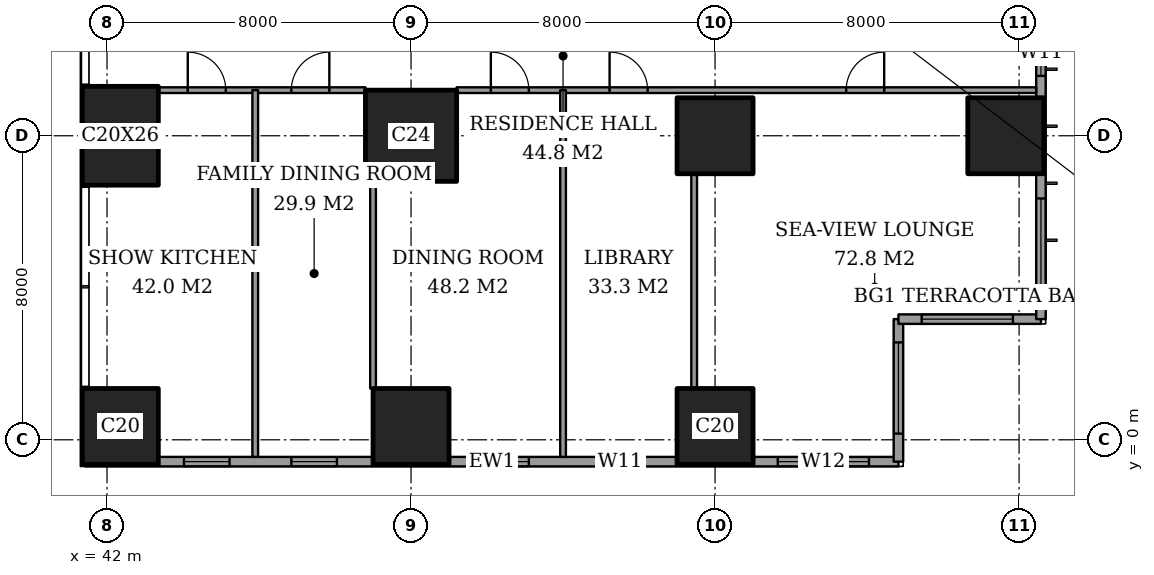
"""IFC4 building model, lengths in metres.
Left out: names, types, materials, properties, quantities, classifications, styles, units other than length and angle.
Written with IfcOpenShell. Run it as: python <this file> out.ifc"""

import sys

from ifc_helpers import new_model, si_unit, direction, frame, frame_2d, origin, origin_2d, place, context, subcontext, project, spatial, rectangle, extrude, element, fill, save


model = new_model("IFC4")
c1 = context("Model", 3, precision=1e-05, world=origin(), true_north=direction((0.0, 1.0)))
c2 = subcontext(c1, "Body", "Model", "MODEL_VIEW")
j1 = project(units=[si_unit("LENGTHUNIT", "METRE"), si_unit("PLANEANGLEUNIT", "RADIAN")], contexts=[c1])
p1 = place(None, origin())
s1 = spatial("IfcSite", under=j1, at=p1, CompositionType="ELEMENT")
p2 = place(p1, origin())
s2 = spatial("IfcBuilding", under=s1, at=p2, CompositionType="ELEMENT")
p3 = place(p2, frame((0.0, 0.0, 117.8)))
s3 = spatial("IfcBuildingStorey", under=s2, at=p3, CompositionType="ELEMENT", Elevation=117.8)
p4 = place(p3, frame((42.35, 0.35, 0.0), z_axis=(0.0, 0.0, 1.0), x_axis=(1.0, 0.0, 0.0)))
e1 = element("IfcColumn", 1, at=p4, inside=s3, PredefinedType="COLUMN", context=c2, shape_type="SweptSolid", body=[
    extrude(rectangle(XDim=2.0, YDim=2.0, at=origin_2d()), origin(), (0.0, 0.0, 1.0), 3.6),
])
p5 = place(p3, frame((42.35, 8.0, 0.0), z_axis=(0.0, 0.0, 1.0), x_axis=(1.0, 0.0, 0.0)))
e2 = element("IfcColumn", 2, at=p5, inside=s3, PredefinedType="COLUMN", context=c2, shape_type="SweptSolid", body=[
    extrude(rectangle(XDim=2.0, YDim=2.6, at=origin_2d()), origin(), (0.0, 0.0, 1.0), 3.6),
])
p6 = place(p3, frame((50.0, 0.35, 0.0), z_axis=(0.0, 0.0, 1.0), x_axis=(1.0, 0.0, 0.0)))
e3 = element("IfcColumn", 3, at=p6, inside=s3, PredefinedType="COLUMN", context=c2, shape_type="SweptSolid", body=[
    extrude(rectangle(XDim=2.0, YDim=2.0, at=origin_2d()), origin(), (0.0, 0.0, 1.0), 3.6),
])
p7 = place(p3, frame((50.0, 8.0, 0.0), z_axis=(0.0, 0.0, 1.0), x_axis=(1.0, 0.0, 0.0)))
e4 = element("IfcColumn", 4, at=p7, inside=s3, PredefinedType="COLUMN", context=c2, shape_type="SweptSolid", body=[
    extrude(rectangle(XDim=2.4, YDim=2.4, at=origin_2d()), origin(), (0.0, 0.0, 1.0), 3.6),
])
for number, where, z_axis, x_axis in (
    (5, (58.0, 0.35, 0.0), (0.0, 0.0, 1.0), (1.0, 0.0, 0.0)),
    (6, (58.0, 8.0, 0.0), (0.0, 0.0, 1.0), (1.0, 0.0, 0.0)),
    (7, (65.65, 8.0, 0.0), (0.0, 0.0, 1.0), (1.0, 0.0, 0.0)),
):
    element("IfcColumn", number, at=place(p3, frame(where, z_axis=z_axis, x_axis=x_axis)), inside=s3, PredefinedType="COLUMN", context=c2, shape_type="SweptSolid", body=[
        extrude(rectangle(XDim=2.0, YDim=2.0, at=origin_2d()), origin(), (0.0, 0.0, 1.0), 3.6),
    ])
p8 = place(p3, frame((41.425, -0.575, 0.0), z_axis=(0.0, 0.0, 1.0), x_axis=(1.0, 0.0, 0.0)))
e8 = element("IfcWall", 8, at=p8, inside=s3, PredefinedType="SOLIDWALL", context=c2, shape_type="SweptSolid", body=[
    extrude(rectangle(XDim=21.4, YDim=0.25, at=frame_2d((10.7, 0.0))), origin(), (0.0, 0.0, 1.0), 3.6),
])
p9 = place(p8, frame((2.6, 0.0, 0.4)))
e9 = element("IfcOpeningElement", 9, at=p9, cuts=e8, PredefinedType="OPENING", context=c2, shape_type="SweptSolid", body=[
    extrude(rectangle(XDim=1.2, YDim=2.2, at=frame_2d((0.6, 1.1))), frame((0.0, 0.135, 0.0), z_axis=(0.0, -1.0, 0.0), x_axis=(1.0, 0.0, 0.0)), (0.0, 0.0, 1.0), 0.27),
])
p10 = place(p8, frame((5.425, 0.0, 0.4)))
e10 = element("IfcOpeningElement", 10, at=p10, cuts=e8, PredefinedType="OPENING", context=c2, shape_type="SweptSolid", body=[
    extrude(rectangle(XDim=1.2, YDim=2.2, at=frame_2d((0.6, 1.1))), frame((0.0, 0.135, 0.0), z_axis=(0.0, -1.0, 0.0), x_axis=(1.0, 0.0, 0.0)), (0.0, 0.0, 1.0), 0.27),
])
p11 = place(p8, frame((10.475, 0.0, 0.4)))
e11 = element("IfcOpeningElement", 11, at=p11, cuts=e8, PredefinedType="OPENING", context=c2, shape_type="SweptSolid", body=[
    extrude(rectangle(XDim=1.2, YDim=2.2, at=frame_2d((0.6, 1.1))), frame((0.0, 0.135, 0.0), z_axis=(0.0, -1.0, 0.0), x_axis=(1.0, 0.0, 0.0)), (0.0, 0.0, 1.0), 0.27),
])
p12 = place(p8, frame((13.475, 0.0, 0.4)))
e12 = element("IfcOpeningElement", 12, at=p12, cuts=e8, PredefinedType="OPENING", context=c2, shape_type="SweptSolid", body=[
    extrude(rectangle(XDim=1.2, YDim=2.2, at=frame_2d((0.6, 1.1))), frame((0.0, 0.135, 0.0), z_axis=(0.0, -1.0, 0.0), x_axis=(1.0, 0.0, 0.0)), (0.0, 0.0, 1.0), 0.27),
])
p13 = place(p8, frame((18.225, 0.0, 0.4)))
e13 = element("IfcOpeningElement", 13, at=p13, cuts=e8, PredefinedType="OPENING", context=c2, shape_type="SweptSolid", body=[
    extrude(rectangle(XDim=2.4, YDim=2.2, at=frame_2d((1.2, 1.1))), frame((0.0, 0.135, 0.0), z_axis=(0.0, -1.0, 0.0), x_axis=(1.0, 0.0, 0.0)), (0.0, 0.0, 1.0), 0.27),
])
p14 = place(p3, frame((62.825, -0.575, 0.0), z_axis=(0.0, 0.0, 1.0), x_axis=(0.0, 1.0, 0.0)))
e14 = element("IfcWall", 14, at=p14, inside=s3, PredefinedType="SOLIDWALL", context=c2, shape_type="SweptSolid", body=[
    extrude(rectangle(XDim=3.75, YDim=0.25, at=frame_2d((1.875, 0.0))), origin(), (0.0, 0.0, 1.0), 3.6),
])
p15 = place(p14, frame((0.738, 0.0, 0.4)))
e15 = element("IfcOpeningElement", 15, at=p15, cuts=e14, PredefinedType="OPENING", context=c2, shape_type="SweptSolid", body=[
    extrude(rectangle(XDim=2.4, YDim=2.2, at=frame_2d((1.2, 1.1))), frame((0.0, 0.135, 0.0), z_axis=(0.0, -1.0, 0.0), x_axis=(1.0, 0.0, 0.0)), (0.0, 0.0, 1.0), 0.27),
])
p16 = place(p3, frame((62.825, 3.175, 0.0), z_axis=(0.0, 0.0, 1.0), x_axis=(1.0, 0.0, 0.0)))
e16 = element("IfcWall", 16, at=p16, inside=s3, PredefinedType="SOLIDWALL", context=c2, shape_type="SweptSolid", body=[
    extrude(rectangle(XDim=3.75, YDim=0.25, at=frame_2d((1.875, 0.0))), origin(), (0.0, 0.0, 1.0), 3.6),
])
p17 = place(p16, frame((0.613, 0.0, 0.4)))
e17 = element("IfcOpeningElement", 17, at=p17, cuts=e16, PredefinedType="OPENING", context=c2, shape_type="SweptSolid", body=[
    extrude(rectangle(XDim=2.4, YDim=2.2, at=frame_2d((1.2, 1.1))), frame((0.0, 0.135, 0.0), z_axis=(0.0, -1.0, 0.0), x_axis=(1.0, 0.0, 0.0)), (0.0, 0.0, 1.0), 0.27),
])
p18 = place(p3, frame((66.575, 3.175, 0.0), z_axis=(0.0, 0.0, 1.0), x_axis=(0.0, 1.0, 0.0)))
e18 = element("IfcWall", 18, at=p18, inside=s3, PredefinedType="SOLIDWALL", context=c2, shape_type="SweptSolid", body=[
    extrude(rectangle(XDim=41.65, YDim=0.25, at=frame_2d((20.825, 0.0))), origin(), (0.0, 0.0, 1.0), 3.6),
])
p19 = place(p18, frame((0.775, 0.0, 0.4)))
e19 = element("IfcOpeningElement", 19, at=p19, cuts=e18, PredefinedType="OPENING", context=c2, shape_type="SweptSolid", body=[
    extrude(rectangle(XDim=2.4, YDim=2.2, at=frame_2d((1.2, 1.1))), frame((0.0, 0.135, 0.0), z_axis=(0.0, -1.0, 0.0), x_axis=(1.0, 0.0, 0.0)), (0.0, 0.0, 1.0), 0.27),
])
p20 = place(p18, frame((6.4, 0.0, 0.4)))
e20 = element("IfcOpeningElement", 20, at=p20, cuts=e18, PredefinedType="OPENING", context=c2, shape_type="SweptSolid", body=[
    extrude(rectangle(XDim=1.2, YDim=2.2, at=frame_2d((0.6, 1.1))), frame((0.0, 0.135, 0.0), z_axis=(0.0, -1.0, 0.0), x_axis=(1.0, 0.0, 0.0)), (0.0, 0.0, 1.0), 0.27),
])
p21 = place(p18, frame((8.475, 0.0, 0.4)))
e21 = element("IfcOpeningElement", 21, at=p21, cuts=e18, PredefinedType="OPENING", context=c2, shape_type="SweptSolid", body=[
    extrude(rectangle(XDim=2.4, YDim=2.2, at=frame_2d((1.2, 1.1))), frame((0.0, 0.135, 0.0), z_axis=(0.0, -1.0, 0.0), x_axis=(1.0, 0.0, 0.0)), (0.0, 0.0, 1.0), 0.27),
])
p22 = place(p18, frame((15.775, 0.0, 0.4)))
e22 = element("IfcOpeningElement", 22, at=p22, cuts=e18, PredefinedType="OPENING", context=c2, shape_type="SweptSolid", body=[
    extrude(rectangle(XDim=2.4, YDim=2.2, at=frame_2d((1.2, 1.1))), frame((0.0, 0.135, 0.0), z_axis=(0.0, -1.0, 0.0), x_axis=(1.0, 0.0, 0.0)), (0.0, 0.0, 1.0), 0.27),
])
p23 = place(p18, frame((23.475, 0.0, 0.4)))
e23 = element("IfcOpeningElement", 23, at=p23, cuts=e18, PredefinedType="OPENING", context=c2, shape_type="SweptSolid", body=[
    extrude(rectangle(XDim=2.4, YDim=2.2, at=frame_2d((1.2, 1.1))), frame((0.0, 0.135, 0.0), z_axis=(0.0, -1.0, 0.0), x_axis=(1.0, 0.0, 0.0)), (0.0, 0.0, 1.0), 0.27),
])
p24 = place(p18, frame((30.975, 0.0, 0.4)))
e24 = element("IfcOpeningElement", 24, at=p24, cuts=e18, PredefinedType="OPENING", context=c2, shape_type="SweptSolid", body=[
    extrude(rectangle(XDim=2.4, YDim=2.2, at=frame_2d((1.2, 1.1))), frame((0.0, 0.135, 0.0), z_axis=(0.0, -1.0, 0.0), x_axis=(1.0, 0.0, 0.0)), (0.0, 0.0, 1.0), 0.27),
])
p25 = place(p18, frame((34.5, 0.0, 0.4)))
e25 = element("IfcOpeningElement", 25, at=p25, cuts=e18, PredefinedType="OPENING", context=c2, shape_type="SweptSolid", body=[
    extrude(rectangle(XDim=1.2, YDim=2.2, at=frame_2d((0.6, 1.1))), frame((0.0, 0.135, 0.0), z_axis=(0.0, -1.0, 0.0), x_axis=(1.0, 0.0, 0.0)), (0.0, 0.0, 1.0), 0.27),
])
p26 = place(p18, frame((38.475, 0.0, 0.4)))
e26 = element("IfcOpeningElement", 26, at=p26, cuts=e18, PredefinedType="OPENING", context=c2, shape_type="SweptSolid", body=[
    extrude(rectangle(XDim=2.4, YDim=2.2, at=frame_2d((1.2, 1.1))), frame((0.0, 0.135, 0.0), z_axis=(0.0, -1.0, 0.0), x_axis=(1.0, 0.0, 0.0)), (0.0, 0.0, 1.0), 0.27),
])
p27 = place(p3, frame((43.35, 9.2, 0.0), z_axis=(0.0, 0.0, 1.0), x_axis=(1.0, 0.0, 0.0)))
e27 = element("IfcWall", 27, at=p27, inside=s3, PredefinedType="PARTITIONING", context=c2, shape_type="SweptSolid", body=[
    extrude(rectangle(XDim=5.45, YDim=0.15, at=frame_2d((2.725, 0.0))), origin(), (0.0, 0.0, 1.0), 3.35),
])
p28 = place(p27, frame((3.5, 0.0, 0.0)))
e28 = element("IfcOpeningElement", 28, at=p28, cuts=e27, PredefinedType="OPENING", context=c2, shape_type="SweptSolid", body=[
    extrude(rectangle(XDim=1.0, YDim=2.1, at=frame_2d((0.5, 1.05))), frame((0.0, 0.085, 0.0), z_axis=(0.0, -1.0, 0.0), x_axis=(1.0, 0.0, 0.0)), (0.0, 0.0, 1.0), 0.17),
])
p29 = place(p27, frame((0.775, 0.0, 0.0)))
e29 = element("IfcOpeningElement", 29, at=p29, cuts=e27, PredefinedType="OPENING", context=c2, shape_type="SweptSolid", body=[
    extrude(rectangle(XDim=1.0, YDim=2.1, at=frame_2d((0.5, 1.05))), frame((0.0, 0.085, 0.0), z_axis=(0.0, -1.0, 0.0), x_axis=(1.0, 0.0, 0.0)), (0.0, 0.0, 1.0), 0.17),
])
p30 = place(p3, frame((51.2, 9.2, 0.0), z_axis=(0.0, 0.0, 1.0), x_axis=(1.0, 0.0, 0.0)))
e30 = element("IfcWall", 30, at=p30, inside=s3, PredefinedType="PARTITIONING", context=c2, shape_type="SweptSolid", body=[
    extrude(rectangle(XDim=15.25, YDim=0.15, at=frame_2d((7.625, 0.0))), origin(), (0.0, 0.0, 1.0), 3.35),
])
p31 = place(p30, frame((10.25, 0.0, 0.0)))
e31 = element("IfcOpeningElement", 31, at=p31, cuts=e30, PredefinedType="OPENING", context=c2, shape_type="SweptSolid", body=[
    extrude(rectangle(XDim=1.0, YDim=2.1, at=frame_2d((0.5, 1.05))), frame((0.0, 0.085, 0.0), z_axis=(0.0, -1.0, 0.0), x_axis=(1.0, 0.0, 0.0)), (0.0, 0.0, 1.0), 0.17),
])
p32 = place(p30, frame((4.025, 0.0, 0.0)))
e32 = element("IfcOpeningElement", 32, at=p32, cuts=e30, PredefinedType="OPENING", context=c2, shape_type="SweptSolid", body=[
    extrude(rectangle(XDim=1.0, YDim=2.1, at=frame_2d((0.5, 1.05))), frame((0.0, 0.085, 0.0), z_axis=(0.0, -1.0, 0.0), x_axis=(1.0, 0.0, 0.0)), (0.0, 0.0, 1.0), 0.17),
])
p33 = place(p30, frame((0.9, 0.0, 0.0)))
e33 = element("IfcOpeningElement", 33, at=p33, cuts=e30, PredefinedType="OPENING", context=c2, shape_type="SweptSolid", body=[
    extrude(rectangle(XDim=1.0, YDim=2.1, at=frame_2d((0.5, 1.05))), frame((0.0, 0.085, 0.0), z_axis=(0.0, -1.0, 0.0), x_axis=(1.0, 0.0, 0.0)), (0.0, 0.0, 1.0), 0.17),
])
p34 = place(p3, frame((45.9, -0.45, 0.0), z_axis=(0.0, 0.0, 1.0), x_axis=(0.0, 1.0, 0.0)))
e34 = element("IfcWall", 34, at=p34, inside=s3, PredefinedType="PARTITIONING", context=c2, shape_type="SweptSolid", body=[
    extrude(rectangle(XDim=9.65, YDim=0.15, at=frame_2d((4.825, 0.0))), origin(), (0.0, 0.0, 1.0), 3.35),
])
p35 = place(p3, frame((49.0, 1.35, 0.0), z_axis=(0.0, 0.0, 1.0), x_axis=(0.0, 1.0, 0.0)))
e35 = element("IfcWall", 35, at=p35, inside=s3, PredefinedType="PARTITIONING", context=c2, shape_type="SweptSolid", body=[
    extrude(rectangle(XDim=5.45, YDim=0.15, at=frame_2d((2.725, 0.0))), origin(), (0.0, 0.0, 1.0), 3.35),
])
p36 = place(p3, frame((54.0, -0.45, 0.0), z_axis=(0.0, 0.0, 1.0), x_axis=(0.0, 1.0, 0.0)))
e36 = element("IfcWall", 36, at=p36, inside=s3, PredefinedType="PARTITIONING", context=c2, shape_type="SweptSolid", body=[
    extrude(rectangle(XDim=9.65, YDim=0.15, at=frame_2d((4.825, 0.0))), origin(), (0.0, 0.0, 1.0), 3.35),
])
p37 = place(p3, frame((57.45, 1.35, 0.0), z_axis=(0.0, 0.0, 1.0), x_axis=(0.0, 1.0, 0.0)))
e37 = element("IfcWall", 37, at=p37, inside=s3, PredefinedType="PARTITIONING", context=c2, shape_type="SweptSolid", body=[
    extrude(rectangle(XDim=5.65, YDim=0.15, at=frame_2d((2.825, 0.0))), origin(), (0.0, 0.0, 1.0), 3.35),
])
p38 = place(p9, origin())
e38 = element("IfcWindow", 38, at=p38, inside=s3, PartitioningType="SINGLE_PANEL", PredefinedType="WINDOW", context=c2, shape_type="SweptSolid", body=[
    extrude(rectangle(XDim=1.2, YDim=2.2, at=frame_2d((0.6, 1.1))), frame((0.0, 0.03, 0.0), z_axis=(0.0, -1.0, 0.0), x_axis=(1.0, 0.0, 0.0)), (0.0, 0.0, 1.0), 0.06),
])
fill(e9, e38)
p39 = place(p10, origin())
e39 = element("IfcWindow", 39, at=p39, inside=s3, PartitioningType="SINGLE_PANEL", PredefinedType="WINDOW", context=c2, shape_type="SweptSolid", body=[
    extrude(rectangle(XDim=1.2, YDim=2.2, at=frame_2d((0.6, 1.1))), frame((0.0, 0.03, 0.0), z_axis=(0.0, -1.0, 0.0), x_axis=(1.0, 0.0, 0.0)), (0.0, 0.0, 1.0), 0.06),
])
fill(e10, e39)
p40 = place(p11, origin())
e40 = element("IfcWindow", 40, at=p40, inside=s3, PartitioningType="SINGLE_PANEL", PredefinedType="WINDOW", context=c2, shape_type="SweptSolid", body=[
    extrude(rectangle(XDim=1.2, YDim=2.2, at=frame_2d((0.6, 1.1))), frame((0.0, 0.03, 0.0), z_axis=(0.0, -1.0, 0.0), x_axis=(1.0, 0.0, 0.0)), (0.0, 0.0, 1.0), 0.06),
])
fill(e11, e40)
p41 = place(p12, origin())
e41 = element("IfcWindow", 41, at=p41, inside=s3, PartitioningType="SINGLE_PANEL", PredefinedType="WINDOW", context=c2, shape_type="SweptSolid", body=[
    extrude(rectangle(XDim=1.2, YDim=2.2, at=frame_2d((0.6, 1.1))), frame((0.0, 0.03, 0.0), z_axis=(0.0, -1.0, 0.0), x_axis=(1.0, 0.0, 0.0)), (0.0, 0.0, 1.0), 0.06),
])
fill(e12, e41)
p42 = place(p13, origin())
e42 = element("IfcWindow", 42, at=p42, inside=s3, PartitioningType="SINGLE_PANEL", PredefinedType="WINDOW", context=c2, shape_type="SweptSolid", body=[
    extrude(rectangle(XDim=2.4, YDim=2.2, at=frame_2d((1.2, 1.1))), frame((0.0, 0.03, 0.0), z_axis=(0.0, -1.0, 0.0), x_axis=(1.0, 0.0, 0.0)), (0.0, 0.0, 1.0), 0.06),
])
fill(e13, e42)
p43 = place(p15, origin())
e43 = element("IfcWindow", 43, at=p43, inside=s3, PartitioningType="SINGLE_PANEL", PredefinedType="WINDOW", context=c2, shape_type="SweptSolid", body=[
    extrude(rectangle(XDim=2.4, YDim=2.2, at=frame_2d((1.2, 1.1))), frame((0.0, 0.03, 0.0), z_axis=(0.0, -1.0, 0.0), x_axis=(1.0, 0.0, 0.0)), (0.0, 0.0, 1.0), 0.06),
])
fill(e15, e43)
p44 = place(p17, origin())
e44 = element("IfcWindow", 44, at=p44, inside=s3, PartitioningType="SINGLE_PANEL", PredefinedType="WINDOW", context=c2, shape_type="SweptSolid", body=[
    extrude(rectangle(XDim=2.4, YDim=2.2, at=frame_2d((1.2, 1.1))), frame((0.0, 0.03, 0.0), z_axis=(0.0, -1.0, 0.0), x_axis=(1.0, 0.0, 0.0)), (0.0, 0.0, 1.0), 0.06),
])
fill(e17, e44)
p45 = place(p19, origin())
e45 = element("IfcWindow", 45, at=p45, inside=s3, PartitioningType="SINGLE_PANEL", PredefinedType="WINDOW", context=c2, shape_type="SweptSolid", body=[
    extrude(rectangle(XDim=2.4, YDim=2.2, at=frame_2d((1.2, 1.1))), frame((0.0, 0.03, 0.0), z_axis=(0.0, -1.0, 0.0), x_axis=(1.0, 0.0, 0.0)), (0.0, 0.0, 1.0), 0.06),
])
fill(e19, e45)
p46 = place(p20, origin())
e46 = element("IfcWindow", 46, at=p46, inside=s3, PartitioningType="SINGLE_PANEL", PredefinedType="WINDOW", context=c2, shape_type="SweptSolid", body=[
    extrude(rectangle(XDim=1.2, YDim=2.2, at=frame_2d((0.6, 1.1))), frame((0.0, 0.03, 0.0), z_axis=(0.0, -1.0, 0.0), x_axis=(1.0, 0.0, 0.0)), (0.0, 0.0, 1.0), 0.06),
])
fill(e20, e46)
p47 = place(p31, origin())
e47 = element("IfcDoor", 47, at=p47, inside=s3, OperationType="SINGLE_SWING_LEFT", PredefinedType="DOOR", context=c2, shape_type="SweptSolid", body=[
    extrude(rectangle(XDim=1.0, YDim=2.1, at=frame_2d((0.5, 1.05))), frame((0.0, 0.025, 0.0), z_axis=(0.0, -1.0, 0.0), x_axis=(1.0, 0.0, 0.0)), (0.0, 0.0, 1.0), 0.05),
])
fill(e31, e47)
p48 = place(p32, origin())
e48 = element("IfcDoor", 48, at=p48, inside=s3, OperationType="SINGLE_SWING_RIGHT", PredefinedType="DOOR", context=c2, shape_type="SweptSolid", body=[
    extrude(rectangle(XDim=1.0, YDim=2.1, at=frame_2d((0.5, 1.05))), frame((0.0, 0.025, 0.0), z_axis=(0.0, -1.0, 0.0), x_axis=(1.0, 0.0, 0.0)), (0.0, 0.0, 1.0), 0.05),
])
fill(e32, e48)
p49 = place(p33, origin())
e49 = element("IfcDoor", 49, at=p49, inside=s3, OperationType="SINGLE_SWING_RIGHT", PredefinedType="DOOR", context=c2, shape_type="SweptSolid", body=[
    extrude(rectangle(XDim=1.0, YDim=2.1, at=frame_2d((0.5, 1.05))), frame((0.0, 0.025, 0.0), z_axis=(0.0, -1.0, 0.0), x_axis=(1.0, 0.0, 0.0)), (0.0, 0.0, 1.0), 0.05),
])
fill(e33, e49)
p50 = place(p28, origin())
e50 = element("IfcDoor", 50, at=p50, inside=s3, OperationType="SINGLE_SWING_LEFT", PredefinedType="DOOR", context=c2, shape_type="SweptSolid", body=[
    extrude(rectangle(XDim=1.0, YDim=2.1, at=frame_2d((0.5, 1.05))), frame((0.0, 0.025, 0.0), z_axis=(0.0, -1.0, 0.0), x_axis=(1.0, 0.0, 0.0)), (0.0, 0.0, 1.0), 0.05),
])
fill(e28, e50)
p51 = place(p29, origin())
e51 = element("IfcDoor", 51, at=p51, inside=s3, OperationType="SINGLE_SWING_RIGHT", PredefinedType="DOOR", context=c2, shape_type="SweptSolid", body=[
    extrude(rectangle(XDim=1.0, YDim=2.1, at=frame_2d((0.5, 1.05))), frame((0.0, 0.025, 0.0), z_axis=(0.0, -1.0, 0.0), x_axis=(1.0, 0.0, 0.0)), (0.0, 0.0, 1.0), 0.05),
])
fill(e29, e51)
save(model, sys.argv[1])
